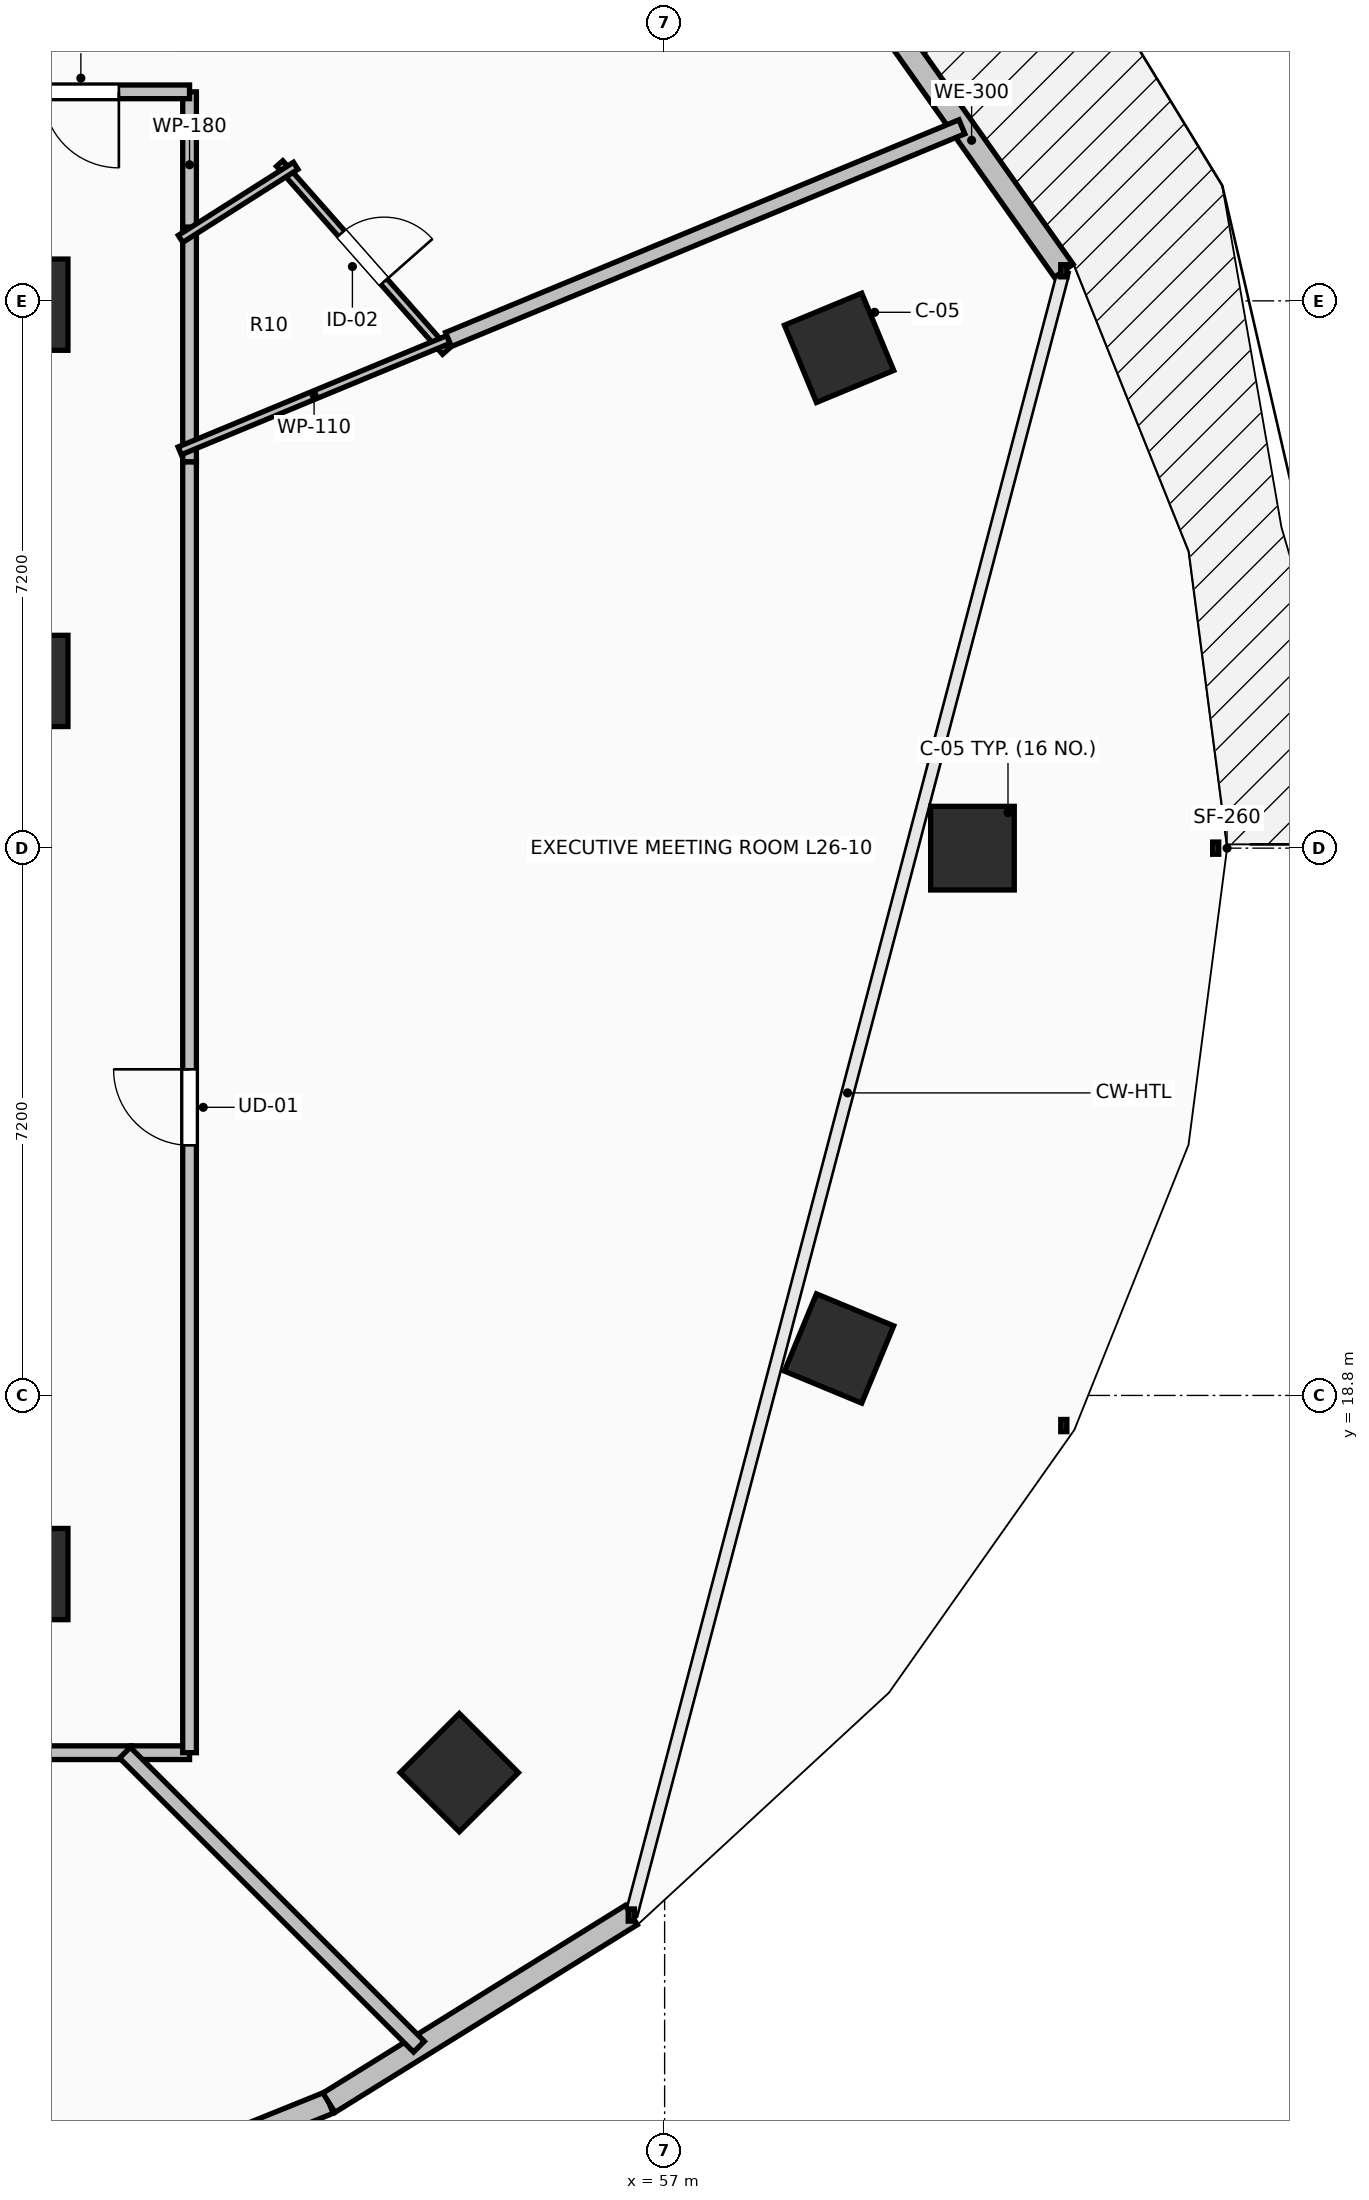
"""IFC4 building model, lengths in metres.
Left out: names, types, materials, properties, quantities, classifications, styles, units other than length and angle.
Written with IfcOpenShell. Run it as: python <this file> out.ifc"""

import sys

from ifc_helpers import new_model, si_unit, direction, frame, frame_2d, origin, origin_2d, place, context, subcontext, project, spatial, rectangle, extrude, element, fill, save


model = new_model("IFC4")
c1 = context("Model", 3, precision=1e-05, world=origin(), true_north=direction((0.0, 1.0)))
c2 = subcontext(c1, "Body", "Model", "MODEL_VIEW")
j1 = project(units=[si_unit("LENGTHUNIT", "METRE"), si_unit("PLANEANGLEUNIT", "RADIAN")], contexts=[c1])
p1 = place(None, origin())
s1 = spatial("IfcSite", under=j1, at=p1, CompositionType="ELEMENT")
p2 = place(p1, origin())
s2 = spatial("IfcBuilding", under=s1, at=p2, CompositionType="ELEMENT")
p3 = place(p2, frame((0.0, 0.0, 99.8)))
s3 = spatial("IfcBuildingStorey", under=s2, at=p3, CompositionType="ELEMENT", Elevation=99.8)
for number, where, z_axis, x_axis in (
    (1, (61.05, 26.0, 0.0), (0.0, 0.0, 1.0), (1.0, 0.0, 0.0)),
    (2, (59.295, 32.582, 0.0), (0.0, 0.0, 1.0), (0.924, 0.383, 0.0)),
    (3, (54.299, 13.838, 0.0), (0.0, 0.0, 1.0), (0.707, -0.707, 0.0)),
    (4, (59.295, 19.418, 0.0), (0.0, 0.0, 1.0), (0.924, -0.383, 0.0)),
):
    element("IfcColumn", number, at=place(p3, frame(where, z_axis=z_axis, x_axis=x_axis)), inside=s3, PredefinedType="COLUMN", context=c2, shape_type="SweptSolid", body=[
        extrude(rectangle(XDim=1.1, YDim=1.1, at=origin_2d()), origin(), (0.0, 0.0, 1.0), 3.5),
    ])
for number, where, z_axis, x_axis in (
    (5, (48.75, 33.15, 0.0), (0.0, 0.0, 1.0), (1.0, 0.0, 0.0)),
    (6, (48.75, 28.2, 0.0), (0.0, 0.0, 1.0), (1.0, 0.0, 0.0)),
    (7, (48.75, 16.45, 0.0), (0.0, 0.0, 1.0), (1.0, 0.0, 0.0)),
):
    element("IfcColumn", number, at=place(p3, frame(where, z_axis=z_axis, x_axis=x_axis)), inside=s3, PredefinedType="PILASTER", context=c2, shape_type="SweptSolid", body=[
        extrude(rectangle(XDim=0.8, YDim=1.2, at=origin_2d()), origin(), (0.0, 0.0, 1.0), 3.5),
    ])
p4 = place(p3, frame((62.252, 33.596, 0.0), z_axis=(0.0, 0.0, 1.0), x_axis=(-0.57716435238, 0.81662801222, 0.0)))
e8 = element("IfcWall", 8, at=p4, inside=s3, PredefinedType="STANDARD", context=c2, shape_type="SweptSolid", body=[
    extrude(rectangle(XDim=4.202, YDim=0.3, at=frame_2d((2.101, 0.0))), origin(), (0.0, 0.0, 1.0), 3.24),
])
p5 = place(p3, frame((48.045, 7.661, 0.0), z_axis=(0.0, 0.0, 1.0), x_axis=(0.927122233109, 0.374759075775, 0.0)))
e9 = element("IfcWall", 9, at=p5, inside=s3, PredefinedType="STANDARD", context=c2, shape_type="SweptSolid", body=[
    extrude(rectangle(XDim=4.895, YDim=0.3, at=frame_2d((2.448, 0.0))), origin(), (0.0, 0.0, 1.0), 3.24),
])
p6 = place(p3, frame((52.584, 9.495, 0.0), z_axis=(0.0, 0.0, 1.0), x_axis=(0.849684479743, 0.527291461038, 0.0)))
e10 = element("IfcWall", 10, at=p6, inside=s3, PredefinedType="STANDARD", context=c2, shape_type="SweptSolid", body=[
    extrude(rectangle(XDim=4.681, YDim=0.3, at=frame_2d((2.341, 0.0))), origin(), (0.0, 0.0, 1.0), 3.24),
])
p7 = place(p3, frame((50.75, 34.031, 0.0), z_axis=(0.0, 0.0, 1.0), x_axis=(0.0, 1.0, 0.0)))
e11 = element("IfcWall", 11, at=p7, inside=s3, PredefinedType="PARTITIONING", context=c2, shape_type="SweptSolid", body=[
    extrude(rectangle(XDim=1.919, YDim=0.18, at=frame_2d((0.959, 0.0))), origin(), (0.0, 0.0, 1.0), 2.432),
])
p8 = place(p3, frame((50.75, 35.95, 0.0), z_axis=(0.0, 0.0, 1.0), x_axis=(-1.0, 0.0, 0.0)))
e12 = element("IfcWall", 12, at=p8, inside=s3, PredefinedType="PARTITIONING", context=c2, shape_type="SweptSolid", body=[
    extrude(rectangle(XDim=2.86, YDim=0.18, at=frame_2d((1.43, 0.0))), origin(), (0.0, 0.0, 1.0), 2.432),
])
p9 = place(p8, frame((0.93, 0.0, 0.0)))
e13 = element("IfcOpeningElement", 13, at=p9, cuts=e12, PredefinedType="OPENING", context=c2, shape_type="SweptSolid", body=[
    extrude(rectangle(XDim=1.0, YDim=2.15, at=frame_2d((0.5, 1.075))), frame((0.0, 0.105, 0.0), z_axis=(0.0, -1.0, 0.0), x_axis=(1.0, 0.0, 0.0)), (0.0, 0.0, 1.0), 0.21),
])
p10 = place(p3, frame((50.75, 31.081, 0.0), z_axis=(0.0, 0.0, 1.0), x_axis=(0.0, 1.0, 0.0)))
e14 = element("IfcWall", 14, at=p10, inside=s3, PredefinedType="PARTITIONING", context=c2, shape_type="SweptSolid", body=[
    extrude(rectangle(XDim=3.09, YDim=0.18, at=frame_2d((1.545, 0.0))), origin(), (0.0, 0.0, 1.0), 2.432),
])
p11 = place(p3, frame((42.34, 14.1, 0.0), z_axis=(0.0, 0.0, 1.0), x_axis=(1.0, 0.0, 0.0)))
e15 = element("IfcWall", 15, at=p11, inside=s3, PredefinedType="PARTITIONING", context=c2, shape_type="SweptSolid", body=[
    extrude(rectangle(XDim=7.645, YDim=0.18, at=frame_2d((3.823, 0.0))), origin(), (0.0, 0.0, 1.0), 2.432),
])
p12 = place(p3, frame((49.985, 14.1, 0.0), z_axis=(0.0, 0.0, 1.0), x_axis=(1.0, 0.0, 0.0)))
e16 = element("IfcWall", 16, at=p12, inside=s3, PredefinedType="PARTITIONING", context=c2, shape_type="SweptSolid", body=[
    extrude(rectangle(XDim=0.765, YDim=0.18, at=frame_2d((0.382, 0.0))), origin(), (0.0, 0.0, 1.0), 2.972),
])
p13 = place(p3, frame((50.75, 14.1, 0.0), z_axis=(0.0, 0.0, 1.0), x_axis=(0.0, 1.0, 0.0)))
e17 = element("IfcWall", 17, at=p13, inside=s3, PredefinedType="PARTITIONING", context=c2, shape_type="SweptSolid", body=[
    extrude(rectangle(XDim=16.981, YDim=0.18, at=frame_2d((8.49, 0.0))), origin(), (0.0, 0.0, 1.0), 2.432),
])
p14 = place(p13, frame((7.99, 0.0, 0.0)))
e18 = element("IfcOpeningElement", 18, at=p14, cuts=e17, PredefinedType="OPENING", context=c2, shape_type="SweptSolid", body=[
    extrude(rectangle(XDim=1.0, YDim=2.15, at=frame_2d((0.5, 1.075))), frame((0.0, 0.105, 0.0), z_axis=(0.0, -1.0, 0.0), x_axis=(1.0, 0.0, 0.0)), (0.0, 0.0, 1.0), 0.21),
])
p15 = place(p3, frame((51.935, 35.007, 0.0), z_axis=(0.0, 0.0, 1.0), x_axis=(0.662059609276, -0.749451181709, 0.0)))
e19 = element("IfcWall", 19, at=p15, inside=s3, PredefinedType="PARTITIONING", context=c2, shape_type="SweptSolid", body=[
    extrude(rectangle(XDim=3.299, YDim=0.11, at=frame_2d((1.65, 0.0))), origin(), (0.0, 0.0, 1.0), 2.432),
])
p16 = place(p15, frame((1.225, 0.0, 0.0)))
e20 = element("IfcOpeningElement", 20, at=p16, cuts=e19, PredefinedType="OPENING", context=c2, shape_type="SweptSolid", body=[
    extrude(rectangle(XDim=0.85, YDim=2.1, at=frame_2d((0.425, 1.05))), frame((0.0, 0.07, 0.0), z_axis=(0.0, -1.0, 0.0), x_axis=(1.0, 0.0, 0.0)), (0.0, 0.0, 1.0), 0.14),
])
p17 = place(p3, frame((54.156, 32.693, 0.0), z_axis=(0.0, 0.0, 1.0), x_axis=(-0.923803754276, -0.382866326002, 0.0)))
e21 = element("IfcWall", 21, at=p17, inside=s3, PredefinedType="PARTITIONING", context=c2, shape_type="SweptSolid", body=[
    extrude(rectangle(XDim=3.827, YDim=0.11, at=frame_2d((1.914, 0.0))), origin(), (0.0, 0.0, 1.0), 2.432),
])
p18 = place(p3, frame((50.632, 34.016, 0.0), z_axis=(0.0, 0.0, 1.0), x_axis=(0.844361394482, 0.535774052665, 0.0)))
e22 = element("IfcWall", 22, at=p18, inside=s3, PredefinedType="PARTITIONING", context=c2, shape_type="SweptSolid", body=[
    extrude(rectangle(XDim=1.793, YDim=0.11, at=frame_2d((0.897, 0.0))), origin(), (0.0, 0.0, 1.0), 2.886),
])
p19 = place(p3, frame((49.053, 37.053, 0.0), z_axis=(0.0, 0.0, 1.0), x_axis=(-0.707106781187, -0.707106781187, 0.0)))
e23 = element("IfcWall", 23, at=p19, inside=s3, PredefinedType="PARTITIONING", context=c2, shape_type="SweptSolid", body=[
    extrude(rectangle(XDim=1.7, YDim=0.2, at=frame_2d((0.85, 0.0))), origin(), (0.0, 0.0, 1.0), 2.432),
])
p20 = place(p3, frame((54.156, 32.692, 0.0), z_axis=(0.0, 0.0, 1.0), x_axis=(0.923875192571, 0.38269390974, 0.0)))
e24 = element("IfcWall", 24, at=p20, inside=s3, PredefinedType="PARTITIONING", context=c2, shape_type="SweptSolid", body=[
    extrude(rectangle(XDim=7.311, YDim=0.2, at=frame_2d((3.656, 0.0))), origin(), (0.0, 0.0, 1.0), 2.432),
])
p21 = place(p3, frame((53.768, 10.232, 0.0), z_axis=(0.0, 0.0, 1.0), x_axis=(-0.707106781187, 0.707106781187, 0.0)))
e25 = element("IfcWall", 25, at=p21, inside=s3, PredefinedType="PARTITIONING", context=c2, shape_type="SweptSolid", body=[
    extrude(rectangle(XDim=5.47, YDim=0.2, at=frame_2d((2.735, 0.0))), origin(), (0.0, 0.0, 1.0), 2.677),
])
p22 = place(p9, origin())
e26 = element("IfcDoor", 26, at=p22, inside=s3, OperationType="SINGLE_SWING_LEFT", PredefinedType="DOOR", context=c2, shape_type="SweptSolid", body=[
    extrude(rectangle(XDim=1.0, YDim=2.15, at=frame_2d((0.5, 1.075))), frame((0.0, 0.025, 0.0), z_axis=(0.0, -1.0, 0.0), x_axis=(1.0, 0.0, 0.0)), (0.0, 0.0, 1.0), 0.05),
])
fill(e13, e26)
p23 = place(p14, origin())
e27 = element("IfcDoor", 27, at=p23, inside=s3, OperationType="SINGLE_SWING_RIGHT", PredefinedType="DOOR", context=c2, shape_type="SweptSolid", body=[
    extrude(rectangle(XDim=1.0, YDim=2.15, at=frame_2d((0.5, 1.075))), frame((0.0, 0.025, 0.0), z_axis=(0.0, -1.0, 0.0), x_axis=(1.0, 0.0, 0.0)), (0.0, 0.0, 1.0), 0.05),
])
fill(e18, e27)
p24 = place(p16, origin())
e28 = element("IfcDoor", 28, at=p24, inside=s3, OperationType="SINGLE_SWING_RIGHT", PredefinedType="DOOR", context=c2, shape_type="SweptSolid", body=[
    extrude(rectangle(XDim=0.85, YDim=2.1, at=frame_2d((0.425, 1.05))), frame((0.0, 0.025, 0.0), z_axis=(0.0, -1.0, 0.0), x_axis=(1.0, 0.0, 0.0)), (0.0, 0.0, 1.0), 0.05),
])
fill(e20, e28)
save(model, sys.argv[1])
